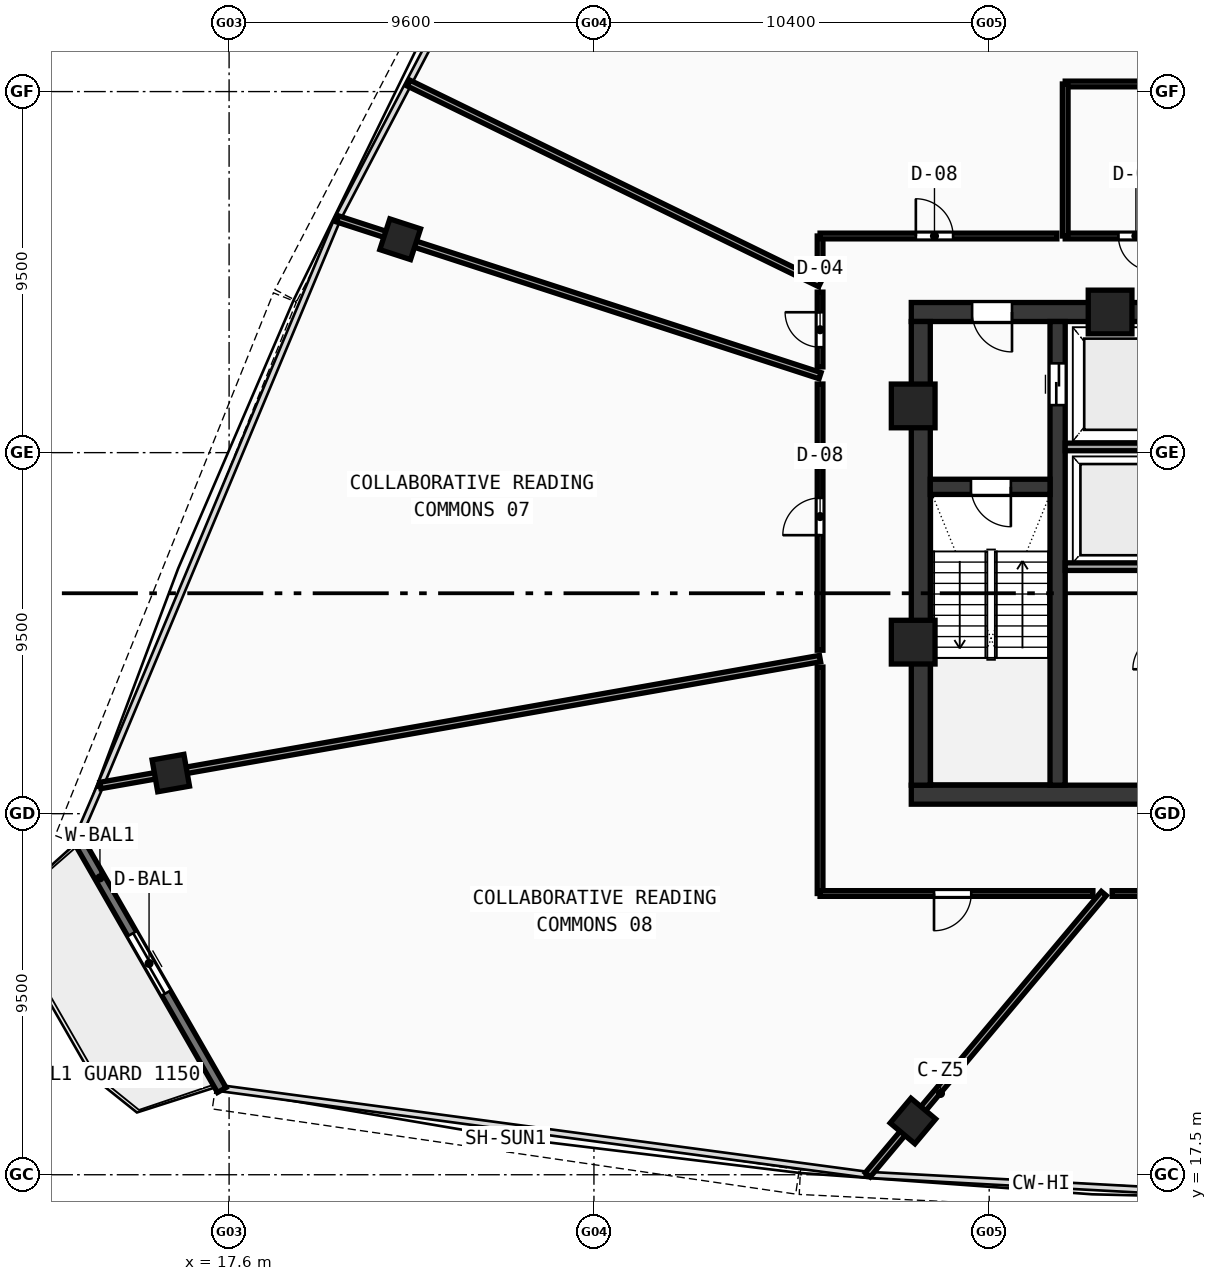
"""IFC4 building model, lengths in metres.
Left out: names, types, materials, properties, quantities, classifications, styles, units other than length and angle.
Written with IfcOpenShell. Run it as: python <this file> out.ifc"""

import sys

from ifc_helpers import new_model, si_unit, direction, frame, frame_2d, origin, origin_with_axes, origin_2d, place, context, subcontext, project, spatial, rectangle, hollow_rectangle, extrude, source, transform, mapped, element, fill, save


model = new_model("IFC4")
c1 = context("Model", 3, precision=1e-05, world=origin(), true_north=direction((0.0, 1.0)))
c2 = subcontext(c1, "Body", "Model", "MODEL_VIEW")
j1 = project(units=[si_unit("LENGTHUNIT", "METRE"), si_unit("PLANEANGLEUNIT", "RADIAN")], contexts=[c1])
p1 = place(None, origin())
s1 = spatial("IfcSite", under=j1, at=p1, CompositionType="ELEMENT")
p2 = place(p1, origin())
s2 = spatial("IfcBuilding", under=s1, at=p2, CompositionType="ELEMENT")
p3 = place(p2, frame((0.0, 0.0, 255.72)))
s3 = spatial("IfcBuildingStorey", under=s2, at=p3, CompositionType="ELEMENT", Elevation=255.72)
p4 = place(p3, frame((35.55, 27.5, 0.0), z_axis=(0.0, 0.0, 1.0), x_axis=(1.0, 0.0, 0.0)))
e1 = element("IfcWall", 1, at=p4, inside=s3, PredefinedType="SHEAR", context=c2, shape_type="SweptSolid", body=[
    extrude(rectangle(XDim=24.9, YDim=0.5, at=frame_2d((12.45, 0.0))), origin(), (0.0, 0.0, 1.0), 3.47),
])
p5 = place(p3, frame((35.55, 40.2, 0.0), z_axis=(0.0, 0.0, 1.0), x_axis=(1.0, 0.0, 0.0)))
e2 = element("IfcWall", 2, at=p5, inside=s3, PredefinedType="SHEAR", context=c2, shape_type="SweptSolid", body=[
    extrude(rectangle(XDim=11.25, YDim=0.5, at=frame_2d((5.625, 0.0))), origin(), (0.0, 0.0, 1.0), 3.47),
])
p6 = place(p5, frame((1.6, 0.0, 0.0)))
e3 = element("IfcOpeningElement", 3, at=p6, cuts=e2, PredefinedType="OPENING", context=c2, shape_type="SweptSolid", body=[
    extrude(rectangle(XDim=1.05, YDim=2.1, at=frame_2d((0.525, 1.05))), frame((0.0, 0.26, 0.0), z_axis=(0.0, -1.0, 0.0), x_axis=(1.0, 0.0, 0.0)), (0.0, 0.0, 1.0), 0.52),
])
p7 = place(p3, frame((35.8, 27.75, 0.0), z_axis=(0.0, 0.0, 1.0), x_axis=(0.0, 1.0, 0.0)))
e4 = element("IfcWall", 4, at=p7, inside=s3, PredefinedType="SHEAR", context=c2, shape_type="SweptSolid", body=[
    extrude(rectangle(XDim=12.2, YDim=0.5, at=frame_2d((6.1, 0.0))), origin(), (0.0, 0.0, 1.0), 3.47),
])
p8 = place(p3, frame((39.4, 27.75, 0.0), z_axis=(0.0, 0.0, 1.0), x_axis=(0.0, 1.0, 0.0)))
e5 = element("IfcWall", 5, at=p8, inside=s3, PredefinedType="SHEAR", context=c2, shape_type="SweptSolid", body=[
    extrude(rectangle(XDim=12.2, YDim=0.4, at=frame_2d((6.1, 0.0))), origin(), (0.0, 0.0, 1.0), 3.47),
])
p9 = place(p8, frame((10.0, 0.0, 0.0)))
e6 = element("IfcOpeningElement", 6, at=p9, cuts=e5, PredefinedType="OPENING", context=c2, shape_type="SweptSolid", body=[
    extrude(rectangle(XDim=1.1, YDim=2.1, at=frame_2d((0.55, 1.05))), frame((0.0, 0.21, 0.0), z_axis=(0.0, -1.0, 0.0), x_axis=(1.0, 0.0, 0.0)), (0.0, 0.0, 1.0), 0.42),
])
p10 = place(p3, frame((36.05, 35.6, 0.0), z_axis=(0.0, 0.0, 1.0), x_axis=(1.0, 0.0, 0.0)))
e7 = element("IfcWall", 7, at=p10, inside=s3, PredefinedType="SHEAR", context=c2, shape_type="SweptSolid", body=[
    extrude(rectangle(XDim=3.15, YDim=0.4, at=frame_2d((1.575, 0.0))), origin(), (0.0, 0.0, 1.0), 3.47),
])
p11 = place(p10, frame((1.07, 0.0, 0.0)))
e8 = element("IfcOpeningElement", 8, at=p11, cuts=e7, PredefinedType="OPENING", context=c2, shape_type="SweptSolid", body=[
    extrude(rectangle(XDim=1.05, YDim=2.1, at=frame_2d((0.525, 1.05))), frame((0.0, 0.21, 0.0), z_axis=(0.0, -1.0, 0.0), x_axis=(1.0, 0.0, 0.0)), (0.0, 0.0, 1.0), 0.42),
])
m1 = source(origin(), c2, "Body", "SweptSolid", [
    extrude(hollow_rectangle(XDim=1.15, YDim=1.15, WallThickness=0.048, at=origin_2d()), origin(), (0.0, 0.0, 1.0), 3.73),
])
for number, where, z_axis, x_axis in (
    (9, (40.781, 40.2, -0.26), (0.0, 0.0, 1.0), (1.0, 0.0, 0.0)),
    (10, (35.6, 37.729, -0.26), (0.0, 0.0, 1.0), (1.0, 0.0, 0.0)),
    (11, (35.6, 31.513, -0.26), (0.0, 0.0, 1.0), (1.0, 0.0, 0.0)),
):
    element("IfcColumn", number, at=place(p3, frame(where, z_axis=z_axis, x_axis=x_axis)), inside=s3, PredefinedType="COLUMN", context=c2, shape_type="MappedRepresentation", body=[
        mapped(m1, transform((0.0, 0.0, 0.0), scale=1.0)),
    ])
m2 = source(origin(), c2, "Body", "SweptSolid", [
    extrude(hollow_rectangle(XDim=0.85, YDim=0.85, WallThickness=0.034, at=origin_2d()), origin(), (0.0, 0.0, 1.0), 3.73),
])
for number, where, z_axis, x_axis in (
    (12, (35.593, 18.914, -0.26), (0.0, 0.0, 1.0), (0.766, -0.643, 0.0)),
    (13, (22.102, 42.115, -0.26), (0.0, 0.0, 1.0), (-0.309, -0.951, 0.0)),
    (14, (16.066, 28.069, -0.26), (0.0, 0.0, 1.0), (0.174, -0.985, 0.0)),
):
    element("IfcColumn", number, at=place(p3, frame(where, z_axis=z_axis, x_axis=x_axis)), inside=s3, PredefinedType="COLUMN", context=c2, shape_type="MappedRepresentation", body=[
        mapped(m2, transform((0.0, 0.0, 0.0), scale=1.0)),
    ])
p12 = place(p3, frame((13.581, 26.392, 0.0), z_axis=(0.0, 0.0, 1.0), x_axis=(0.497934343816, -0.867214730761, 0.0)))
e15 = element("IfcWall", 15, at=p12, inside=s3, PredefinedType="STANDARD", context=c2, shape_type="SweptSolid", body=[
    extrude(rectangle(XDim=7.684, YDim=0.26, at=frame_2d((3.842, 0.0))), origin(), (0.0, 0.0, 1.0), 3.47),
])
p13 = place(p12, frame((2.942, 0.0, 0.0)))
e16 = element("IfcOpeningElement", 16, at=p13, cuts=e15, PredefinedType="OPENING", context=c2, shape_type="SweptSolid", body=[
    extrude(rectangle(XDim=1.8, YDim=2.15, at=frame_2d((0.9, 1.075))), frame((0.0, 0.14, 0.0), z_axis=(0.0, -1.0, 0.0), x_axis=(1.0, 0.0, 0.0)), (0.0, 0.0, 1.0), 0.28),
])
for number, where, z_axis, x_axis in (
    (17, (39.6, 36.65, 0.0), (0.0, 0.0, 1.0), (1.0, 0.0, 0.0)),
    (18, (39.6, 33.5, 0.0), (0.0, 0.0, 1.0), (1.0, 0.0, 0.0)),
):
    element("IfcWall", number, at=place(p3, frame(where, z_axis=z_axis, x_axis=x_axis)), inside=s3, PredefinedType="SOLIDWALL", context=c2, shape_type="SweptSolid", body=[
        extrude(rectangle(XDim=2.72, YDim=0.2, at=frame_2d((1.36, 0.0))), origin(), (0.0, 0.0, 1.0), 3.47),
    ])
p14 = place(p3, frame((39.6, 42.2, 0.0), z_axis=(0.0, 0.0, 1.0), x_axis=(1.0, 0.0, 0.0)))
e19 = element("IfcWall", 19, at=p14, inside=s3, PredefinedType="PARTITIONING", context=c2, shape_type="SweptSolid", body=[
    extrude(rectangle(XDim=4.35, YDim=0.15, at=frame_2d((2.175, 0.0))), origin(), (0.0, 0.0, 1.0), 3.47),
])
p15 = place(p14, frame((1.4, 0.0, 0.0)))
e20 = element("IfcOpeningElement", 20, at=p15, cuts=e19, PredefinedType="OPENING", context=c2, shape_type="SweptSolid", body=[
    extrude(rectangle(XDim=0.92, YDim=2.1, at=frame_2d((0.46, 1.05))), frame((0.0, 0.085, 0.0), z_axis=(0.0, -1.0, 0.0), x_axis=(1.0, 0.0, 0.0)), (0.0, 0.0, 1.0), 0.17),
])
p16 = place(p3, frame((39.6, 46.2, 0.0), z_axis=(0.0, 0.0, 1.0), x_axis=(1.0, 0.0, 0.0)))
e21 = element("IfcWall", 21, at=p16, inside=s3, PredefinedType="PARTITIONING", context=c2, shape_type="SweptSolid", body=[
    extrude(rectangle(XDim=4.35, YDim=0.15, at=frame_2d((2.175, 0.0))), origin(), (0.0, 0.0, 1.0), 2.82),
])
p17 = place(p3, frame((39.6, 42.2, 0.0), z_axis=(0.0, 0.0, 1.0), x_axis=(0.0, 1.0, 0.0)))
e22 = element("IfcWall", 22, at=p17, inside=s3, PredefinedType="PARTITIONING", context=c2, shape_type="SweptSolid", body=[
    extrude(rectangle(XDim=4.0, YDim=0.15, at=frame_2d((2.0, 0.0))), origin(), (0.0, 0.0, 1.0), 3.47),
])
p18 = place(p3, frame((42.435, 46.2, 0.0), z_axis=(0.0, 0.0, 1.0), x_axis=(-0.406732494706, 0.913547304605, 0.0)))
e23 = element("IfcWall", 23, at=p18, inside=s3, PredefinedType="PARTITIONING", context=c2, shape_type="SweptSolid", body=[
    extrude(rectangle(XDim=21.123, YDim=0.17, at=frame_2d((10.562, 0.0))), origin(), (0.0, 0.0, 1.0), 2.82),
])
p19 = place(p3, frame((33.15, 40.943, 0.0), z_axis=(0.0, 0.0, 1.0), x_axis=(-0.89879494126, 0.438369311842, 0.0)))
e24 = element("IfcWall", 24, at=p19, inside=s3, PredefinedType="PARTITIONING", context=c2, shape_type="SweptSolid", body=[
    extrude(rectangle(XDim=12.043, YDim=0.17, at=frame_2d((6.021, 0.0))), origin(), (0.0, 0.0, 1.0), 2.82),
])
p20 = place(p3, frame((33.15, 38.525, 0.0), z_axis=(0.0, 0.0, 1.0), x_axis=(-0.951055435747, 0.30902031994, 0.0)))
e25 = element("IfcWall", 25, at=p20, inside=s3, PredefinedType="PARTITIONING", context=c2, shape_type="SweptSolid", body=[
    extrude(rectangle(XDim=13.349, YDim=0.17, at=frame_2d((6.675, 0.0))), origin(), (0.0, 0.0, 1.0), 2.82),
])
p21 = place(p3, frame((33.15, 31.082, 0.0), z_axis=(0.0, 0.0, 1.0), x_axis=(-0.984808346381, -0.173644812474, 0.0)))
e26 = element("IfcWall", 26, at=p21, inside=s3, PredefinedType="PARTITIONING", context=c2, shape_type="SweptSolid", body=[
    extrude(rectangle(XDim=19.228, YDim=0.17, at=frame_2d((9.614, 0.0))), origin(), (0.0, 0.0, 1.0), 2.82),
])
p22 = place(p3, frame((40.616, 24.9, 0.0), z_axis=(0.0, 0.0, 1.0), x_axis=(-0.642795010628, -0.766038232931, 0.0)))
e27 = element("IfcWall", 27, at=p22, inside=s3, PredefinedType="PARTITIONING", context=c2, shape_type="SweptSolid", body=[
    extrude(rectangle(XDim=9.663, YDim=0.17, at=frame_2d((4.832, 0.0))), origin(), (0.0, 0.0, 1.0), 2.82),
])
p23 = place(p3, frame((33.15, 24.9, 0.0), z_axis=(0.0, 0.0, 1.0), x_axis=(0.0, 1.0, 0.0)))
e28 = element("IfcWall", 28, at=p23, inside=s3, PredefinedType="PARTITIONING", context=c2, shape_type="SweptSolid", body=[
    extrude(rectangle(XDim=5.958, YDim=0.15, at=frame_2d((2.979, 0.0))), origin(), (0.0, 0.0, 1.0), 3.12),
])
p24 = place(p3, frame((33.15, 31.301, 0.0), z_axis=(0.0, 0.0, 1.0), x_axis=(0.0, 1.0, 0.0)))
e29 = element("IfcWall", 29, at=p24, inside=s3, PredefinedType="PARTITIONING", context=c2, shape_type="SweptSolid", body=[
    extrude(rectangle(XDim=7.004, YDim=0.15, at=frame_2d((3.502, 0.0))), origin(), (0.0, 0.0, 1.0), 3.47),
])
p25 = place(p24, frame((3.027, 0.0, 0.0)))
e30 = element("IfcOpeningElement", 30, at=p25, cuts=e29, PredefinedType="OPENING", context=c2, shape_type="SweptSolid", body=[
    extrude(rectangle(XDim=0.98, YDim=2.12, at=frame_2d((0.49, 1.06))), frame((0.0, 0.085, 0.0), z_axis=(0.0, -1.0, 0.0), x_axis=(1.0, 0.0, 0.0)), (0.0, 0.0, 1.0), 0.17),
])
p26 = place(p3, frame((33.15, 38.756, 0.0), z_axis=(0.0, 0.0, 1.0), x_axis=(0.0, 1.0, 0.0)))
e31 = element("IfcWall", 31, at=p26, inside=s3, PredefinedType="PARTITIONING", context=c2, shape_type="SweptSolid", body=[
    extrude(rectangle(XDim=1.967, YDim=0.15, at=frame_2d((0.983, 0.0))), origin(), (0.0, 0.0, 1.0), 3.47),
])
p27 = place(p26, frame((0.518, 0.0, 0.0)))
e32 = element("IfcOpeningElement", 32, at=p27, cuts=e31, PredefinedType="OPENING", context=c2, shape_type="SweptSolid", body=[
    extrude(rectangle(XDim=0.92, YDim=2.1, at=frame_2d((0.46, 1.05))), frame((0.0, 0.085, 0.0), z_axis=(0.0, -1.0, 0.0), x_axis=(1.0, 0.0, 0.0)), (0.0, 0.0, 1.0), 0.17),
])
p28 = place(p3, frame((33.15, 41.188, 0.0), z_axis=(0.0, 0.0, 1.0), x_axis=(0.0, 1.0, 0.0)))
e33 = element("IfcWall", 33, at=p28, inside=s3, PredefinedType="PARTITIONING", context=c2, shape_type="SweptSolid", body=[
    extrude(rectangle(XDim=1.012, YDim=0.15, at=frame_2d((0.506, 0.0))), origin(), (0.0, 0.0, 1.0), 3.12),
])
p29 = place(p3, frame((33.15, 42.2, 0.0), z_axis=(0.0, 0.0, 1.0), x_axis=(1.0, 0.0, 0.0)))
e34 = element("IfcWall", 34, at=p29, inside=s3, PredefinedType="PARTITIONING", context=c2, shape_type="SweptSolid", body=[
    extrude(rectangle(XDim=6.23, YDim=0.15, at=frame_2d((3.115, 0.0))), origin(), (0.0, 0.0, 1.0), 2.82),
])
p30 = place(p29, frame((2.52, 0.0, 0.0)))
e35 = element("IfcOpeningElement", 35, at=p30, cuts=e34, PredefinedType="OPENING", context=c2, shape_type="SweptSolid", body=[
    extrude(rectangle(XDim=0.98, YDim=2.12, at=frame_2d((0.49, 1.06))), frame((0.0, 0.085, 0.0), z_axis=(0.0, -1.0, 0.0), x_axis=(1.0, 0.0, 0.0)), (0.0, 0.0, 1.0), 0.17),
])
p31 = place(p3, frame((45.414, 24.9, 0.0), z_axis=(0.0, 0.0, 1.0), x_axis=(-1.0, 0.0, 0.0)))
e36 = element("IfcWall", 36, at=p31, inside=s3, PredefinedType="PARTITIONING", context=c2, shape_type="SweptSolid", body=[
    extrude(rectangle(XDim=4.579, YDim=0.15, at=frame_2d((2.289, 0.0))), origin(), (0.0, 0.0, 1.0), 2.82),
])
p32 = place(p31, frame((1.81, 0.0, 0.0)))
e37 = element("IfcOpeningElement", 37, at=p32, cuts=e36, PredefinedType="OPENING", context=c2, shape_type="SweptSolid", body=[
    extrude(rectangle(XDim=0.98, YDim=2.12, at=frame_2d((0.49, 1.06))), frame((0.0, 0.085, 0.0), z_axis=(0.0, -1.0, 0.0), x_axis=(1.0, 0.0, 0.0)), (0.0, 0.0, 1.0), 0.17),
])
p33 = place(p3, frame((40.329, 24.9, 0.0), z_axis=(0.0, 0.0, 1.0), x_axis=(-1.0, 0.0, 0.0)))
e38 = element("IfcWall", 38, at=p33, inside=s3, PredefinedType="PARTITIONING", context=c2, shape_type="SweptSolid", body=[
    extrude(rectangle(XDim=7.179, YDim=0.15, at=frame_2d((3.589, 0.0))), origin(), (0.0, 0.0, 1.0), 3.12),
])
p34 = place(p33, frame((3.201, 0.0, 0.0)))
e39 = element("IfcOpeningElement", 39, at=p34, cuts=e38, PredefinedType="OPENING", context=c2, shape_type="SweptSolid", body=[
    extrude(rectangle(XDim=0.98, YDim=2.12, at=frame_2d((0.49, 1.06))), frame((0.0, 0.085, 0.0), z_axis=(0.0, -1.0, 0.0), x_axis=(1.0, 0.0, 0.0)), (0.0, 0.0, 1.0), 0.17),
])
m3 = source(origin(), c2, "Body", "SweptSolid", [
    extrude(rectangle(XDim=1.8, YDim=2.15, at=frame_2d((0.9, 1.075))), frame((0.0, 0.025, 0.0), z_axis=(0.0, -1.0, 0.0), x_axis=(1.0, 0.0, 0.0)), (0.0, 0.0, 1.0), 0.05),
])
p35 = place(p13, origin_with_axes())
e40 = element("IfcDoor", 40, at=p35, inside=s3, OperationType="DOUBLE_DOOR_SLIDING", PredefinedType="DOOR", context=c2, shape_type="MappedRepresentation", body=[
    mapped(m3, transform((0.0, 0.0, 0.0), scale=1.0)),
])
fill(e16, e40)
m4 = source(origin(), c2, "Body", "SweptSolid", [
    extrude(rectangle(XDim=1.05, YDim=2.1, at=frame_2d((0.525, 1.05))), frame((0.0, 0.025, 0.0), z_axis=(0.0, -1.0, 0.0), x_axis=(1.0, 0.0, 0.0)), (0.0, 0.0, 1.0), 0.05),
])
p36 = place(p11, frame((1.05, 0.0, 0.0), z_axis=(0.0, 0.0, 1.0), x_axis=(-1.0, 0.0, 0.0)))
e41 = element("IfcDoor", 41, at=p36, inside=s3, OperationType="SINGLE_SWING_LEFT", PredefinedType="DOOR", context=c2, shape_type="MappedRepresentation", body=[
    mapped(m4, transform((0.0, 0.0, 0.0), scale=1.0)),
])
fill(e8, e41)
p37 = place(p6, frame((1.05, 0.0, 0.0), z_axis=(0.0, 0.0, 1.0), x_axis=(-1.0, 0.0, 0.0)))
e42 = element("IfcDoor", 42, at=p37, inside=s3, OperationType="SINGLE_SWING_LEFT", PredefinedType="DOOR", context=c2, shape_type="MappedRepresentation", body=[
    mapped(m4, transform((0.0, 0.0, 0.0), scale=1.0)),
])
fill(e3, e42)
m5 = source(origin(), c2, "Body", "SweptSolid", [
    extrude(rectangle(XDim=1.1, YDim=2.1, at=frame_2d((0.55, 1.05))), frame((0.0, 0.025, 0.0), z_axis=(0.0, -1.0, 0.0), x_axis=(1.0, 0.0, 0.0)), (0.0, 0.0, 1.0), 0.05),
])
p38 = place(p9, frame((1.1, 0.0, 0.0), z_axis=(0.0, 0.0, 1.0), x_axis=(-1.0, 0.0, 0.0)))
e43 = element("IfcDoor", 43, at=p38, inside=s3, OperationType="DOUBLE_DOOR_SLIDING", PredefinedType="DOOR", context=c2, shape_type="MappedRepresentation", body=[
    mapped(m5, transform((0.0, 0.0, 0.0), scale=1.0)),
])
fill(e6, e43)
m6 = source(origin(), c2, "Body", "SweptSolid", [
    extrude(rectangle(XDim=0.92, YDim=2.1, at=frame_2d((0.46, 1.05))), frame((0.0, 0.025, 0.0), z_axis=(0.0, -1.0, 0.0), x_axis=(1.0, 0.0, 0.0)), (0.0, 0.0, 1.0), 0.05),
])
p39 = place(p15, frame((0.92, 0.0, 0.0), z_axis=(0.0, 0.0, 1.0), x_axis=(-1.0, 0.0, 0.0)))
e44 = element("IfcDoor", 44, at=p39, inside=s3, OperationType="SINGLE_SWING_LEFT", PredefinedType="DOOR", context=c2, shape_type="MappedRepresentation", body=[
    mapped(m6, transform((0.0, 0.0, 0.0), scale=1.0)),
])
fill(e20, e44)
m7 = source(origin(), c2, "Body", "SweptSolid", [
    extrude(rectangle(XDim=0.98, YDim=2.12, at=frame_2d((0.49, 1.06))), frame((0.0, 0.025, 0.0), z_axis=(0.0, -1.0, 0.0), x_axis=(1.0, 0.0, 0.0)), (0.0, 0.0, 1.0), 0.05),
])
p40 = place(p30, origin_with_axes())
e45 = element("IfcDoor", 45, at=p40, inside=s3, OperationType="SINGLE_SWING_LEFT", PredefinedType="DOOR", context=c2, shape_type="MappedRepresentation", body=[
    mapped(m7, transform((0.0, 0.0, 0.0), scale=1.0)),
])
fill(e35, e45)
p41 = place(p27, origin_with_axes())
e46 = element("IfcDoor", 46, at=p41, inside=s3, OperationType="SINGLE_SWING_RIGHT", PredefinedType="DOOR", context=c2, shape_type="MappedRepresentation", body=[
    mapped(m6, transform((0.0, 0.0, 0.0), scale=1.0)),
])
fill(e32, e46)
p42 = place(p25, origin_with_axes())
e47 = element("IfcDoor", 47, at=p42, inside=s3, OperationType="SINGLE_SWING_LEFT", PredefinedType="DOOR", context=c2, shape_type="MappedRepresentation", body=[
    mapped(m7, transform((0.0, 0.0, 0.0), scale=1.0)),
])
fill(e30, e47)
p43 = place(p34, origin_with_axes())
e48 = element("IfcDoor", 48, at=p43, inside=s3, OperationType="SINGLE_SWING_RIGHT", PredefinedType="DOOR", context=c2, shape_type="MappedRepresentation", body=[
    mapped(m7, transform((0.0, 0.0, 0.0), scale=1.0)),
])
fill(e39, e48)
save(model, sys.argv[1])
